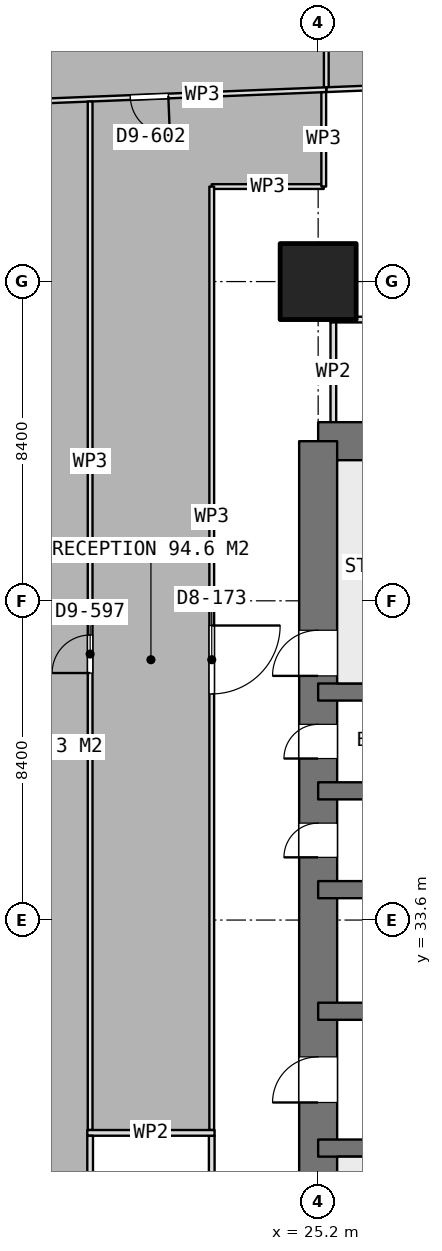
"""IFC4 building model, lengths in metres.
Left out: names, types, materials, properties, quantities, classifications, styles, units other than length and angle.
Written with IfcOpenShell. Run it as: python <this file> out.ifc"""

import sys

from ifc_helpers import new_model, si_unit, direction, frame, frame_2d, origin, origin_2d, place, context, subcontext, project, spatial, rectangle, extrude, element, fill, save


model = new_model("IFC4")
c1 = context("Model", 3, precision=1e-05, world=origin(), true_north=direction((0.0, 1.0)))
c2 = subcontext(c1, "Body", "Model", "MODEL_VIEW")
j1 = project(units=[si_unit("LENGTHUNIT", "METRE"), si_unit("PLANEANGLEUNIT", "RADIAN")], contexts=[c1])
p1 = place(None, origin())
s1 = spatial("IfcSite", under=j1, at=p1, CompositionType="ELEMENT")
p2 = place(p1, origin())
s2 = spatial("IfcBuilding", under=s1, at=p2, CompositionType="ELEMENT")
p3 = place(p2, frame((0.0, 0.0, 147.8)))
s3 = spatial("IfcBuildingStorey", under=s2, at=p3, CompositionType="ELEMENT", Elevation=147.8)
p4 = place(p3, frame((25.2, 46.2, 0.0), z_axis=(0.0, 0.0, 1.0), x_axis=(1.0, 0.0, 0.0)))
e1 = element("IfcWall", 1, at=p4, inside=s3, PredefinedType="SHEAR", context=c2, shape_type="SweptSolid", body=[
    extrude(rectangle(XDim=10.4, YDim=1.0, at=frame_2d((5.2, 0.0))), origin(), (0.0, 0.0, 1.0), 3.75),
])
p5 = place(p3, frame((25.2, 21.0, 0.0), z_axis=(0.0, 0.0, 1.0), x_axis=(0.0, 1.0, 0.0)))
e2 = element("IfcWall", 2, at=p5, inside=s3, PredefinedType="SHEAR", context=c2, shape_type="SweptSolid", body=[
    extrude(rectangle(XDim=25.2, YDim=1.0, at=frame_2d((12.6, 0.0))), origin(), (0.0, 0.0, 1.0), 3.75),
])
p6 = place(p5, frame((7.8, 0.0, 0.0)))
e3 = element("IfcOpeningElement", 3, at=p6, cuts=e2, PredefinedType="OPENING", context=c2, shape_type="SweptSolid", body=[
    extrude(rectangle(XDim=1.2, YDim=2.1, at=frame_2d((0.6, 1.05))), frame((0.0, 0.51, 0.0), z_axis=(0.0, -1.0, 0.0), x_axis=(1.0, 0.0, 0.0)), (0.0, 0.0, 1.0), 1.02),
])
p7 = place(p5, frame((14.25, 0.0, 0.0)))
e4 = element("IfcOpeningElement", 4, at=p7, cuts=e2, PredefinedType="OPENING", context=c2, shape_type="SweptSolid", body=[
    extrude(rectangle(XDim=0.9, YDim=2.1, at=frame_2d((0.45, 1.05))), frame((0.0, 0.51, 0.0), z_axis=(0.0, -1.0, 0.0), x_axis=(1.0, 0.0, 0.0)), (0.0, 0.0, 1.0), 1.02),
])
p8 = place(p5, frame((16.85, 0.0, 0.0)))
e5 = element("IfcOpeningElement", 5, at=p8, cuts=e2, PredefinedType="OPENING", context=c2, shape_type="SweptSolid", body=[
    extrude(rectangle(XDim=0.9, YDim=2.1, at=frame_2d((0.45, 1.05))), frame((0.0, 0.51, 0.0), z_axis=(0.0, -1.0, 0.0), x_axis=(1.0, 0.0, 0.0)), (0.0, 0.0, 1.0), 1.02),
])
p9 = place(p5, frame((19.025, 0.0, 0.0)))
e6 = element("IfcOpeningElement", 6, at=p9, cuts=e2, PredefinedType="OPENING", context=c2, shape_type="SweptSolid", body=[
    extrude(rectangle(XDim=1.2, YDim=2.1, at=frame_2d((0.6, 1.05))), frame((0.0, 0.51, 0.0), z_axis=(0.0, -1.0, 0.0), x_axis=(1.0, 0.0, 0.0)), (0.0, 0.0, 1.0), 1.02),
])
p10 = place(p3, frame((25.2, 27.6, 0.0), z_axis=(0.0, 0.0, 1.0), x_axis=(1.0, 0.0, 0.0)))
e7 = element("IfcWall", 7, at=p10, inside=s3, PredefinedType="SHEAR", context=c2, shape_type="SweptSolid", body=[
    extrude(rectangle(XDim=6.6, YDim=0.45, at=frame_2d((3.3, 0.0))), origin(), (0.0, 0.0, 1.0), 3.75),
])
p11 = place(p10, frame((4.975, 0.0, 0.0)))
e8 = element("IfcOpeningElement", 8, at=p11, cuts=e7, PredefinedType="OPENING", context=c2, shape_type="SweptSolid", body=[
    extrude(rectangle(XDim=1.2, YDim=2.1, at=frame_2d((0.6, 1.05))), frame((0.0, 0.235, 0.0), z_axis=(0.0, -1.0, 0.0), x_axis=(1.0, 0.0, 0.0)), (0.0, 0.0, 1.0), 0.47),
])
p12 = place(p3, frame((25.2, 31.2, 0.0), z_axis=(0.0, 0.0, 1.0), x_axis=(1.0, 0.0, 0.0)))
e9 = element("IfcWall", 9, at=p12, inside=s3, PredefinedType="SHEAR", context=c2, shape_type="SweptSolid", body=[
    extrude(rectangle(XDim=6.6, YDim=0.45, at=frame_2d((3.3, 0.0))), origin(), (0.0, 0.0, 1.0), 3.75),
])
p13 = place(p12, frame((2.65, 0.0, 0.0)))
e10 = element("IfcOpeningElement", 10, at=p13, cuts=e9, PredefinedType="OPENING", context=c2, shape_type="SweptSolid", body=[
    extrude(rectangle(XDim=1.3, YDim=2.1, at=frame_2d((0.65, 1.05))), frame((0.0, 0.235, 0.0), z_axis=(0.0, -1.0, 0.0), x_axis=(1.0, 0.0, 0.0)), (0.0, 0.0, 1.0), 0.47),
])
for number, where, z_axis, x_axis in (
    (11, (25.2, 34.4, 0.0), (0.0, 0.0, 1.0), (1.0, 0.0, 0.0)),
    (12, (25.2, 37.0, 0.0), (0.0, 0.0, 1.0), (1.0, 0.0, 0.0)),
    (13, (25.2, 39.6, 0.0), (0.0, 0.0, 1.0), (1.0, 0.0, 0.0)),
):
    element("IfcWall", number, at=place(p3, frame(where, z_axis=z_axis, x_axis=x_axis)), inside=s3, PredefinedType="SHEAR", context=c2, shape_type="SweptSolid", body=[
        extrude(rectangle(XDim=6.6, YDim=0.45, at=frame_2d((3.3, 0.0))), origin(), (0.0, 0.0, 1.0), 3.75),
    ])
p14 = place(p3, frame((25.2, 50.4, 0.0), z_axis=(0.0, 0.0, 1.0), x_axis=(1.0, 0.0, 0.0)))
e14 = element("IfcColumn", 14, at=p14, inside=s3, PredefinedType="COLUMN", context=c2, shape_type="SweptSolid", body=[
    extrude(rectangle(XDim=2.0, YDim=2.0, at=origin_2d()), origin(), (0.0, 0.0, 1.0), 3.75),
])
p15 = place(p3, frame((25.525, 49.4, 0.0), z_axis=(0.0, 0.0, 1.0), x_axis=(1.0, 0.0, 0.0)))
e15 = element("IfcWall", 15, at=p15, inside=s3, PredefinedType="PARTITIONING", context=c2, shape_type="SweptSolid", body=[
    extrude(rectangle(XDim=9.75, YDim=0.15, at=frame_2d((4.875, 0.0))), origin(), (0.0, 0.0, 1.0), 3.5),
])
p16 = place(p15, frame((4.375, 0.0, 0.0)))
e16 = element("IfcOpeningElement", 16, at=p16, cuts=e15, PredefinedType="OPENING", context=c2, shape_type="SweptSolid", body=[
    extrude(rectangle(XDim=1.0, YDim=2.1, at=frame_2d((0.5, 1.05))), frame((0.0, 0.085, 0.0), z_axis=(0.0, -1.0, 0.0), x_axis=(1.0, 0.0, 0.0)), (0.0, 0.0, 1.0), 0.17),
])
p17 = place(p3, frame((25.6, 46.7, 0.0), z_axis=(0.0, 0.0, 1.0), x_axis=(0.0, 1.0, 0.0)))
e17 = element("IfcWall", 17, at=p17, inside=s3, PredefinedType="PARTITIONING", context=c2, shape_type="SweptSolid", body=[
    extrude(rectangle(XDim=2.625, YDim=0.15, at=frame_2d((1.312, 0.0))), origin(), (0.0, 0.0, 1.0), 3.5),
])
p18 = place(p3, frame((19.125, 28.0, 0.0), z_axis=(0.0, 0.0, 1.0), x_axis=(1.0, 0.0, 0.0)))
e18 = element("IfcWall", 18, at=p18, inside=s3, PredefinedType="PARTITIONING", context=c2, shape_type="SweptSolid", body=[
    extrude(rectangle(XDim=3.35, YDim=0.15, at=frame_2d((1.675, 0.0))), origin(), (0.0, 0.0, 1.0), 3.5),
])
p19 = place(p3, frame((19.2, 21.075, 0.0), z_axis=(0.0, 0.0, 1.0), x_axis=(0.0, 1.0, 0.0)))
e19 = element("IfcWall", 19, at=p19, inside=s3, PredefinedType="PARTITIONING", context=c2, shape_type="SweptSolid", body=[
    extrude(rectangle(XDim=6.85, YDim=0.15, at=frame_2d((3.425, 0.0))), origin(), (0.0, 0.0, 1.0), 3.5),
])
p20 = place(p3, frame((22.4, 21.075, 0.0), z_axis=(0.0, 0.0, 1.0), x_axis=(0.0, 1.0, 0.0)))
e20 = element("IfcWall", 20, at=p20, inside=s3, PredefinedType="PARTITIONING", context=c2, shape_type="SweptSolid", body=[
    extrude(rectangle(XDim=6.85, YDim=0.15, at=frame_2d((3.425, 0.0))), origin(), (0.0, 0.0, 1.0), 3.5),
])
p21 = place(p20, frame((2.925, 0.0, 0.0)))
e21 = element("IfcOpeningElement", 21, at=p21, cuts=e20, PredefinedType="OPENING", context=c2, shape_type="SweptSolid", body=[
    extrude(rectangle(XDim=1.0, YDim=2.1, at=frame_2d((0.5, 1.05))), frame((0.0, 0.085, 0.0), z_axis=(0.0, -1.0, 0.0), x_axis=(1.0, 0.0, 0.0)), (0.0, 0.0, 1.0), 0.17),
])
p22 = place(p3, frame((25.414, 55.449, 0.0), z_axis=(0.0, 0.0, 1.0), x_axis=(0.0, 1.0, 0.0)))
e22 = element("IfcWall", 22, at=p22, inside=s3, PredefinedType="PARTITIONING", context=c2, shape_type="SweptSolid", body=[
    extrude(rectangle(XDim=2.331, YDim=0.125, at=frame_2d((1.166, 0.0))), origin(), (0.0, 0.0, 1.0), 3.5),
])
p23 = place(p3, frame((33.827, 55.786, 0.0), z_axis=(0.0, 0.0, 1.0), x_axis=(-0.999199058446, -0.04001551701, 0.0)))
e23 = element("IfcWall", 23, at=p23, inside=s3, PredefinedType="PARTITIONING", context=c2, shape_type="SweptSolid", body=[
    extrude(rectangle(XDim=8.42, YDim=0.125, at=frame_2d((4.21, 0.0))), origin(), (0.0, 0.0, 1.0), 3.5),
])
p24 = place(p3, frame((25.413, 55.449, 0.0), z_axis=(0.0, 0.0, 1.0), x_axis=(-0.999198361773, -0.04003290935, 0.0)))
e24 = element("IfcWall", 24, at=p24, inside=s3, PredefinedType="PARTITIONING", context=c2, shape_type="SweptSolid", body=[
    extrude(rectangle(XDim=9.319, YDim=0.125, at=frame_2d((4.659, 0.0))), origin(), (0.0, 0.0, 1.0), 3.5),
])
p25 = place(p24, frame((4.159, 0.0, 0.0)))
e25 = element("IfcOpeningElement", 25, at=p25, cuts=e24, PredefinedType="OPENING", context=c2, shape_type="SweptSolid", body=[
    extrude(rectangle(XDim=1.0, YDim=2.1, at=frame_2d((0.5, 1.05))), frame((0.0, 0.073, 0.0), z_axis=(0.0, -1.0, 0.0), x_axis=(1.0, 0.0, 0.0)), (0.0, 0.0, 1.0), 0.145),
])
p26 = place(p3, frame((25.347, 52.9, 0.0), z_axis=(0.0, 0.0, 1.0), x_axis=(-1.0, 0.0, 0.0)))
e26 = element("IfcWall", 26, at=p26, inside=s3, PredefinedType="PARTITIONING", context=c2, shape_type="SweptSolid", body=[
    extrude(rectangle(XDim=2.947, YDim=0.125, at=frame_2d((1.474, 0.0))), origin(), (0.0, 0.0, 1.0), 3.5),
])
p27 = place(p3, frame((22.4, 52.9, 0.0), z_axis=(0.0, 0.0, 1.0), x_axis=(0.0, -1.0, 0.0)))
e27 = element("IfcWall", 27, at=p27, inside=s3, PredefinedType="PARTITIONING", context=c2, shape_type="SweptSolid", body=[
    extrude(rectangle(XDim=24.825, YDim=0.125, at=frame_2d((12.413, 0.0))), origin(), (0.0, 0.0, 1.0), 3.5),
])
p28 = place(p27, frame((11.55, 0.0, 0.0)))
e28 = element("IfcOpeningElement", 28, at=p28, cuts=e27, PredefinedType="OPENING", context=c2, shape_type="SweptSolid", body=[
    extrude(rectangle(XDim=1.8, YDim=2.1, at=frame_2d((0.9, 1.05))), frame((0.0, 0.073, 0.0), z_axis=(0.0, -1.0, 0.0), x_axis=(1.0, 0.0, 0.0)), (0.0, 0.0, 1.0), 0.145),
])
p29 = place(p3, frame((19.2, 28.075, 0.0), z_axis=(0.0, 0.0, 1.0), x_axis=(0.0, 1.0, 0.0)))
e29 = element("IfcWall", 29, at=p29, inside=s3, PredefinedType="PARTITIONING", context=c2, shape_type="SweptSolid", body=[
    extrude(rectangle(XDim=27.063, YDim=0.125, at=frame_2d((13.531, 0.0))), origin(), (0.0, 0.0, 1.0), 3.5),
])
p30 = place(p29, frame((12.025, 0.0, 0.0)))
e30 = element("IfcOpeningElement", 30, at=p30, cuts=e29, PredefinedType="OPENING", context=c2, shape_type="SweptSolid", body=[
    extrude(rectangle(XDim=1.0, YDim=2.1, at=frame_2d((0.5, 1.05))), frame((0.0, 0.073, 0.0), z_axis=(0.0, -1.0, 0.0), x_axis=(1.0, 0.0, 0.0)), (0.0, 0.0, 1.0), 0.145),
])
p31 = place(p3, frame((25.347, 55.384, 0.0), z_axis=(0.0, 0.0, 1.0), x_axis=(0.0, -1.0, 0.0)))
e31 = element("IfcWall", 31, at=p31, inside=s3, PredefinedType="PARTITIONING", context=c2, shape_type="SweptSolid", body=[
    extrude(rectangle(XDim=2.484, YDim=0.125, at=frame_2d((1.242, 0.0))), origin(), (0.0, 0.0, 1.0), 3.5),
])
p32 = place(p6, origin())
e32 = element("IfcDoor", 32, at=p32, inside=s3, OperationType="SINGLE_SWING_LEFT", PredefinedType="DOOR", context=c2, shape_type="SweptSolid", body=[
    extrude(rectangle(XDim=1.2, YDim=2.1, at=frame_2d((0.6, 1.05))), frame((0.0, 0.025, 0.0), z_axis=(0.0, -1.0, 0.0), x_axis=(1.0, 0.0, 0.0)), (0.0, 0.0, 1.0), 0.05),
])
fill(e3, e32)
p33 = place(p7, origin())
e33 = element("IfcDoor", 33, at=p33, inside=s3, OperationType="SINGLE_SWING_LEFT", PredefinedType="DOOR", context=c2, shape_type="SweptSolid", body=[
    extrude(rectangle(XDim=0.9, YDim=2.1, at=frame_2d((0.45, 1.05))), frame((0.0, 0.025, 0.0), z_axis=(0.0, -1.0, 0.0), x_axis=(1.0, 0.0, 0.0)), (0.0, 0.0, 1.0), 0.05),
])
fill(e4, e33)
p34 = place(p8, origin())
e34 = element("IfcDoor", 34, at=p34, inside=s3, OperationType="SINGLE_SWING_LEFT", PredefinedType="DOOR", context=c2, shape_type="SweptSolid", body=[
    extrude(rectangle(XDim=0.9, YDim=2.1, at=frame_2d((0.45, 1.05))), frame((0.0, 0.025, 0.0), z_axis=(0.0, -1.0, 0.0), x_axis=(1.0, 0.0, 0.0)), (0.0, 0.0, 1.0), 0.05),
])
fill(e5, e34)
p35 = place(p28, origin())
e35 = element("IfcDoor", 35, at=p35, inside=s3, OperationType="DOUBLE_DOOR_SINGLE_SWING", PredefinedType="DOOR", context=c2, shape_type="SweptSolid", body=[
    extrude(rectangle(XDim=1.8, YDim=2.1, at=frame_2d((0.9, 1.05))), frame((0.0, 0.025, 0.0), z_axis=(0.0, -1.0, 0.0), x_axis=(1.0, 0.0, 0.0)), (0.0, 0.0, 1.0), 0.05),
])
fill(e28, e35)
p36 = place(p25, origin())
e36 = element("IfcDoor", 36, at=p36, inside=s3, OperationType="SINGLE_SWING_LEFT", PredefinedType="DOOR", context=c2, shape_type="SweptSolid", body=[
    extrude(rectangle(XDim=1.0, YDim=2.1, at=frame_2d((0.5, 1.05))), frame((0.0, 0.025, 0.0), z_axis=(0.0, -1.0, 0.0), x_axis=(1.0, 0.0, 0.0)), (0.0, 0.0, 1.0), 0.05),
])
fill(e25, e36)
p37 = place(p30, origin())
e37 = element("IfcDoor", 37, at=p37, inside=s3, OperationType="SINGLE_SWING_LEFT", PredefinedType="DOOR", context=c2, shape_type="SweptSolid", body=[
    extrude(rectangle(XDim=1.0, YDim=2.1, at=frame_2d((0.5, 1.05))), frame((0.0, 0.025, 0.0), z_axis=(0.0, -1.0, 0.0), x_axis=(1.0, 0.0, 0.0)), (0.0, 0.0, 1.0), 0.05),
])
fill(e30, e37)
p38 = place(p9, origin())
e38 = element("IfcDoor", 38, at=p38, inside=s3, OperationType="SINGLE_SWING_RIGHT", PredefinedType="DOOR", context=c2, shape_type="SweptSolid", body=[
    extrude(rectangle(XDim=1.2, YDim=2.1, at=frame_2d((0.6, 1.05))), frame((0.0, 0.025, 0.0), z_axis=(0.0, -1.0, 0.0), x_axis=(1.0, 0.0, 0.0)), (0.0, 0.0, 1.0), 0.05),
])
fill(e6, e38)
save(model, sys.argv[1])
